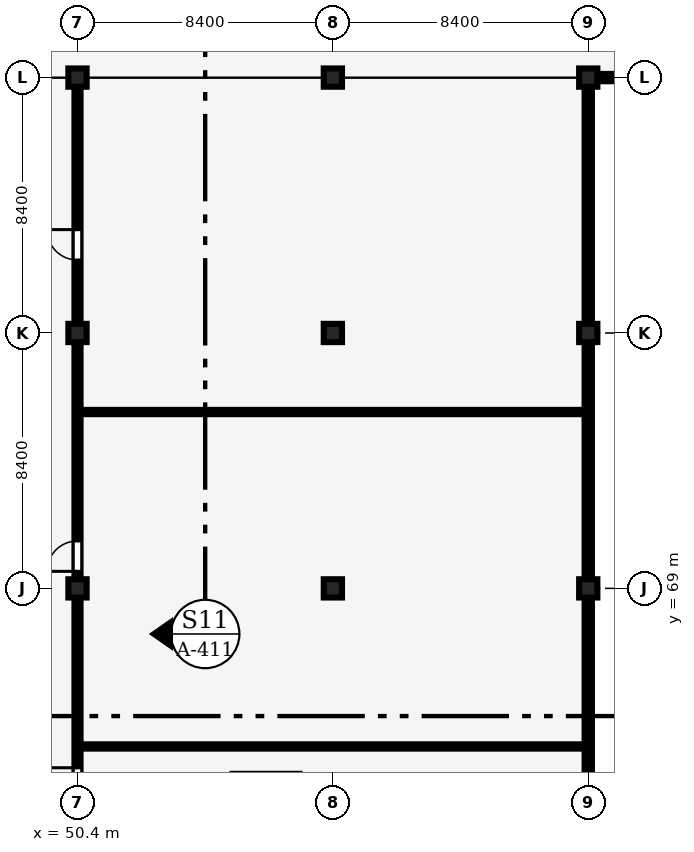
"""IFC4 building model, lengths in metres.
Left out: names, types, materials, properties, quantities, classifications, styles, units other than length and angle.
Written with IfcOpenShell. Run it as: python <this file> out.ifc"""

import sys

from ifc_helpers import new_model, si_unit, direction, frame, frame_2d, origin, origin_2d, place, context, subcontext, project, spatial, rectangle, extrude, element, fill, save


model = new_model("IFC4")
c1 = context("Model", 3, precision=1e-05, world=origin(), true_north=direction((0.0, 1.0)))
c2 = subcontext(c1, "Body", "Model", "MODEL_VIEW")
j1 = project(units=[si_unit("LENGTHUNIT", "METRE"), si_unit("PLANEANGLEUNIT", "RADIAN")], contexts=[c1])
p1 = place(None, origin())
s1 = spatial("IfcSite", under=j1, at=p1, CompositionType="ELEMENT")
p2 = place(p1, origin())
s2 = spatial("IfcBuilding", under=s1, at=p2, CompositionType="ELEMENT")
p3 = place(p2, frame((0.0, 0.0, 4.8)))
s3 = spatial("IfcBuildingStorey", under=s2, at=p3, CompositionType="ELEMENT", Elevation=4.8)
for number, where, z_axis, x_axis in (
    (1, (50.4, 69.0, 0.0), (0.0, 0.0, 1.0), (1.0, 0.0, 0.0)),
    (2, (50.4, 77.4, 0.0), (0.0, 0.0, 1.0), (1.0, 0.0, 0.0)),
    (3, (50.4, 85.8, 0.0), (0.0, 0.0, 1.0), (1.0, 0.0, 0.0)),
    (4, (58.8, 69.0, 0.0), (0.0, 0.0, 1.0), (1.0, 0.0, 0.0)),
    (5, (58.8, 77.4, 0.0), (0.0, 0.0, 1.0), (1.0, 0.0, 0.0)),
    (6, (58.8, 85.8, 0.0), (0.0, 0.0, 1.0), (1.0, 0.0, 0.0)),
    (7, (67.2, 69.0, 0.0), (0.0, 0.0, 1.0), (1.0, 0.0, 0.0)),
    (8, (67.2, 77.4, 0.0), (0.0, 0.0, 1.0), (1.0, 0.0, 0.0)),
    (9, (67.2, 85.8, 0.0), (0.0, 0.0, 1.0), (1.0, 0.0, 0.0)),
):
    element("IfcColumn", number, at=place(p3, frame(where, z_axis=z_axis, x_axis=x_axis)), inside=s3, PredefinedType="COLUMN", context=c2, shape_type="SweptSolid", body=[
        extrude(rectangle(XDim=0.6, YDim=0.6, at=origin_2d()), origin(), (0.0, 0.0, 1.0), 4.2),
    ])
for number, where, z_axis, x_axis in (
    (10, (67.2, 60.875, 0.0), (0.0, 0.0, 1.0), (0.0, 1.0, 0.0)),
    (11, (67.2, 69.275, 0.0), (0.0, 0.0, 1.0), (0.0, 1.0, 0.0)),
):
    element("IfcWall", number, at=place(p3, frame(where, z_axis=z_axis, x_axis=x_axis)), inside=s3, PredefinedType="SOLIDWALL", context=c2, shape_type="SweptSolid", body=[
        extrude(rectangle(XDim=7.85, YDim=0.24, at=frame_2d((3.925, 0.0))), origin(), (0.0, 0.0, 1.0), 1.15),
    ])
p4 = place(p3, frame((67.2, 77.675, 0.0), z_axis=(0.0, 0.0, 1.0), x_axis=(0.0, 1.0, 0.0)))
e12 = element("IfcWall", 12, at=p4, inside=s3, PredefinedType="SOLIDWALL", context=c2, shape_type="SweptSolid", body=[
    extrude(rectangle(XDim=7.85, YDim=0.24, at=frame_2d((3.925, 0.0))), origin(), (0.0, 0.0, 1.0), 1.15),
])
p5 = place(p3, frame((67.475, 85.8, 0.0), z_axis=(0.0, 0.0, 1.0), x_axis=(1.0, 0.0, 0.0)))
e13 = element("IfcWall", 13, at=p5, inside=s3, PredefinedType="SOLIDWALL", context=c2, shape_type="SweptSolid", body=[
    extrude(rectangle(XDim=7.921, YDim=0.24, at=frame_2d((3.961, 0.0))), origin(), (0.0, 0.0, 1.0), 1.1),
])
for number, where, z_axis, x_axis in (
    (14, (50.505, 63.8, 0.0), (0.0, 0.0, 1.0), (1.0, 0.0, 0.0)),
    (15, (50.505, 74.8, 0.0), (0.0, 0.0, 1.0), (1.0, 0.0, 0.0)),
):
    element("IfcWall", number, at=place(p3, frame(where, z_axis=z_axis, x_axis=x_axis)), inside=s3, PredefinedType="PARTITIONING", context=c2, shape_type="SweptSolid", body=[
        extrude(rectangle(XDim=16.57, YDim=0.14, at=frame_2d((8.285, 0.0))), origin(), (0.0, 0.0, 1.0), 3.51),
    ])
p6 = place(p3, frame((50.4, 60.91, 0.0), z_axis=(0.0, 0.0, 1.0), x_axis=(0.0, 1.0, 0.0)))
e16 = element("IfcWall", 16, at=p6, inside=s3, PredefinedType="PARTITIONING", context=c2, shape_type="SweptSolid", body=[
    extrude(rectangle(XDim=7.78, YDim=0.2, at=frame_2d((3.89, 0.0))), origin(), (0.0, 0.0, 1.0), 3.01),
])
p7 = place(p6, frame((1.29, 0.0, 0.0)))
e17 = element("IfcOpeningElement", 17, at=p7, cuts=e16, PredefinedType="OPENING", context=c2, shape_type="SweptSolid", body=[
    extrude(rectangle(XDim=0.9, YDim=2.1, at=frame_2d((0.45, 1.05))), frame((0.0, 0.11, 0.0), z_axis=(0.0, -1.0, 0.0), x_axis=(1.0, 0.0, 0.0)), (0.0, 0.0, 1.0), 0.22),
])
p8 = place(p3, frame((50.4, 69.31, 0.0), z_axis=(0.0, 0.0, 1.0), x_axis=(0.0, 1.0, 0.0)))
e18 = element("IfcWall", 18, at=p8, inside=s3, PredefinedType="PARTITIONING", context=c2, shape_type="SweptSolid", body=[
    extrude(rectangle(XDim=7.78, YDim=0.2, at=frame_2d((3.89, 0.0))), origin(), (0.0, 0.0, 1.0), 2.96),
])
p9 = place(p8, frame((0.25, 0.0, 0.0)))
e19 = element("IfcOpeningElement", 19, at=p9, cuts=e18, PredefinedType="OPENING", context=c2, shape_type="SweptSolid", body=[
    extrude(rectangle(XDim=1.0, YDim=2.15, at=frame_2d((0.5, 1.075))), frame((0.0, 0.11, 0.0), z_axis=(0.0, -1.0, 0.0), x_axis=(1.0, 0.0, 0.0)), (0.0, 0.0, 1.0), 0.22),
])
p10 = place(p3, frame((50.4, 77.71, 0.0), z_axis=(0.0, 0.0, 1.0), x_axis=(0.0, 1.0, 0.0)))
e20 = element("IfcWall", 20, at=p10, inside=s3, PredefinedType="PARTITIONING", context=c2, shape_type="SweptSolid", body=[
    extrude(rectangle(XDim=7.78, YDim=0.2, at=frame_2d((3.89, 0.0))), origin(), (0.0, 0.0, 1.0), 2.91),
])
p11 = place(p10, frame((2.09, 0.0, 0.0)))
e21 = element("IfcOpeningElement", 21, at=p11, cuts=e20, PredefinedType="OPENING", context=c2, shape_type="SweptSolid", body=[
    extrude(rectangle(XDim=1.0, YDim=2.15, at=frame_2d((0.5, 1.075))), frame((0.0, 0.11, 0.0), z_axis=(0.0, -1.0, 0.0), x_axis=(1.0, 0.0, 0.0)), (0.0, 0.0, 1.0), 0.22),
])
p12 = place(p7, origin())
e22 = element("IfcDoor", 22, at=p12, inside=s3, OperationType="SINGLE_SWING_RIGHT", PredefinedType="DOOR", context=c2, shape_type="SweptSolid", body=[
    extrude(rectangle(XDim=0.9, YDim=2.1, at=frame_2d((0.45, 1.05))), frame((0.0, 0.025, 0.0), z_axis=(0.0, -1.0, 0.0), x_axis=(1.0, 0.0, 0.0)), (0.0, 0.0, 1.0), 0.05),
])
fill(e17, e22)
p13 = place(p9, origin())
e23 = element("IfcDoor", 23, at=p13, inside=s3, OperationType="SINGLE_SWING_LEFT", PredefinedType="DOOR", context=c2, shape_type="SweptSolid", body=[
    extrude(rectangle(XDim=1.0, YDim=2.15, at=frame_2d((0.5, 1.075))), frame((0.0, 0.025, 0.0), z_axis=(0.0, -1.0, 0.0), x_axis=(1.0, 0.0, 0.0)), (0.0, 0.0, 1.0), 0.05),
])
fill(e19, e23)
p14 = place(p11, origin())
e24 = element("IfcDoor", 24, at=p14, inside=s3, OperationType="SINGLE_SWING_RIGHT", PredefinedType="DOOR", context=c2, shape_type="SweptSolid", body=[
    extrude(rectangle(XDim=1.0, YDim=2.15, at=frame_2d((0.5, 1.075))), frame((0.0, 0.025, 0.0), z_axis=(0.0, -1.0, 0.0), x_axis=(1.0, 0.0, 0.0)), (0.0, 0.0, 1.0), 0.05),
])
fill(e21, e24)
save(model, sys.argv[1])
